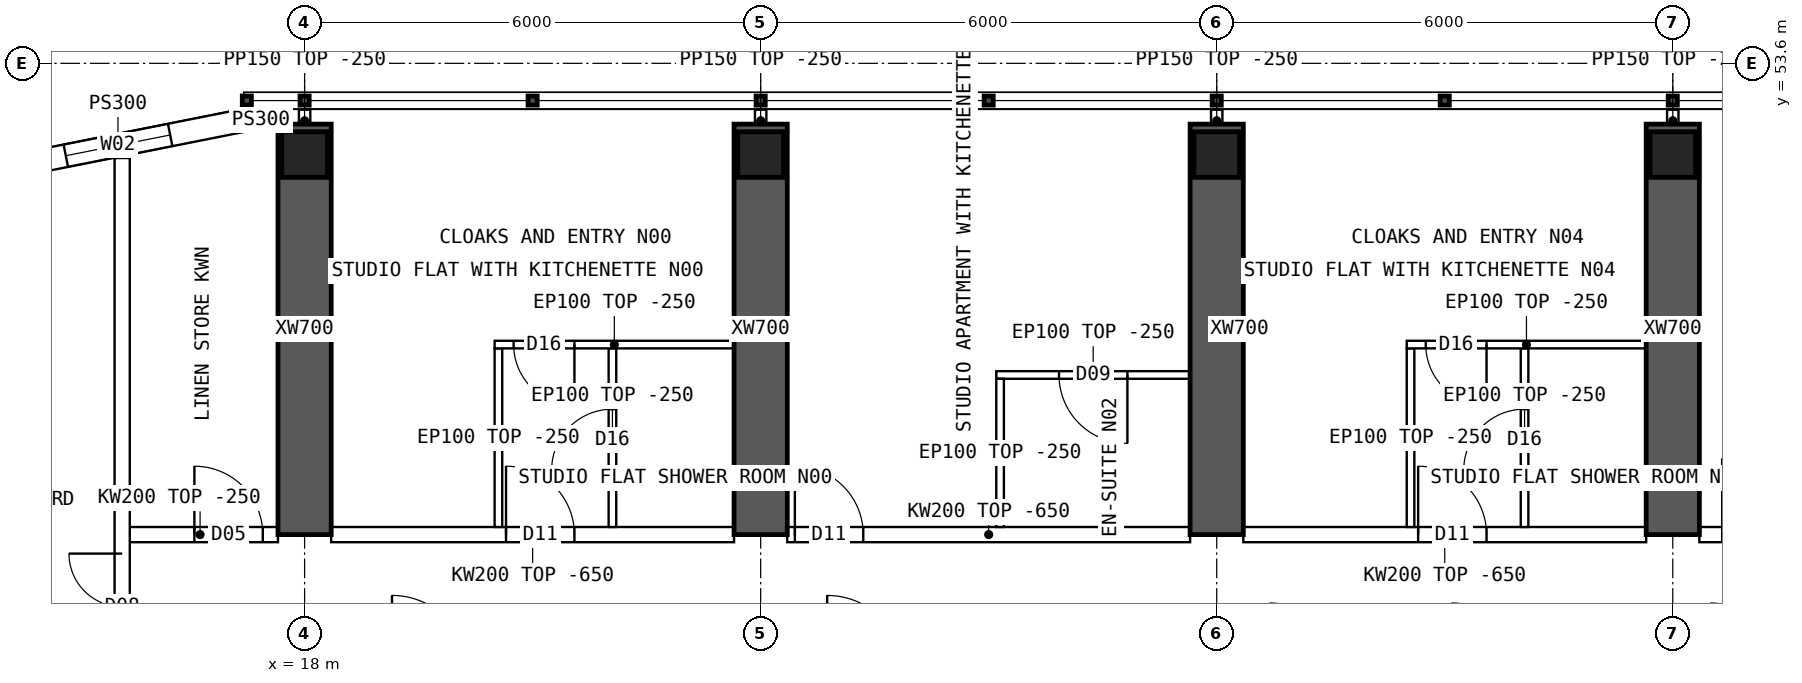
"""IFC4 building model, lengths in metres.
Left out: names, types, materials, properties, quantities, classifications, styles, units other than length and angle.
Written with IfcOpenShell. Run it as: python <this file> out.ifc"""

import sys

from ifc_helpers import new_model, si_unit, direction, frame, frame_2d, origin, origin_2d, place, context, subcontext, project, spatial, polyline, rectangle, hollow_rectangle, outline, extrude, element, fill, save


model = new_model("IFC4")
c1 = context("Model", 3, precision=1e-05, world=origin(), true_north=direction((0.0, 1.0)))
c2 = subcontext(c1, "Body", "Model", "MODEL_VIEW")
j1 = project(units=[si_unit("LENGTHUNIT", "METRE"), si_unit("PLANEANGLEUNIT", "RADIAN")], contexts=[c1])
p1 = place(None, origin())
s1 = spatial("IfcSite", under=j1, at=p1, CompositionType="ELEMENT")
p2 = place(p1, origin())
s2 = spatial("IfcBuilding", under=s1, at=p2, CompositionType="ELEMENT")
p3 = place(p2, frame((0.0, 0.0, 231.55)))
s3 = spatial("IfcBuildingStorey", under=s2, at=p3, CompositionType="ELEMENT", Elevation=231.55)
for number, where, z_axis, x_axis in (
    (1, (18.0, 52.4, 0.0), (0.0, 0.0, 1.0), (1.0, 0.0, 0.0)),
    (2, (24.0, 52.4, 0.0), (0.0, 0.0, 1.0), (1.0, 0.0, 0.0)),
    (3, (30.0, 52.4, 0.0), (0.0, 0.0, 1.0), (1.0, 0.0, 0.0)),
    (4, (36.0, 52.4, 0.0), (0.0, 0.0, 1.0), (1.0, 0.0, 0.0)),
):
    element("IfcColumn", number, at=place(p3, frame(where, z_axis=z_axis, x_axis=x_axis)), inside=s3, PredefinedType="COLUMN", context=c2, shape_type="SweptSolid", body=[
        extrude(hollow_rectangle(XDim=0.6, YDim=0.6, WallThickness=0.06, at=origin_2d()), origin(), (0.0, 0.0, 1.0), 3.75),
    ])
for number, where, z_axis, x_axis in (
    (5, (18.0, 47.4, 0.0), (0.0, 0.0, 1.0), (0.0, 1.0, 0.0)),
    (6, (24.0, 47.4, 0.0), (0.0, 0.0, 1.0), (0.0, 1.0, 0.0)),
    (7, (30.0, 47.4, 0.0), (0.0, 0.0, 1.0), (0.0, 1.0, 0.0)),
    (8, (36.0, 47.4, 0.0), (0.0, 0.0, 1.0), (0.0, 1.0, 0.0)),
):
    element("IfcWall", number, at=place(p3, frame(where, z_axis=z_axis, x_axis=x_axis)), inside=s3, PredefinedType="SHEAR", context=c2, shape_type="SweptSolid", body=[
        extrude(rectangle(XDim=5.4, YDim=0.7, at=frame_2d((2.7, 0.0))), origin(), (0.0, 0.0, 1.0), 3.75),
    ])
p4 = place(p3, frame((17.2, 52.85, 0.0), z_axis=(0.0, 0.0, 1.0), x_axis=(-0.98078325777, -0.195100490205, 0.0)))
e9 = element("IfcWall", 9, at=p4, inside=s3, PredefinedType="SOLIDWALL", context=c2, shape_type="SweptSolid", body=[
    extrude(outline(polyline([(-0.03, -0.15), (3.405, -0.15), (3.345, 0.15), (0.03, 0.15), (-0.03, -0.15)])), origin(), (0.0, 0.0, 1.0), 3.5),
])
p5 = place(p4, frame((0.988, 0.0, 0.9)))
e10 = element("IfcOpeningElement", 10, at=p5, cuts=e9, PredefinedType="OPENING", context=c2, shape_type="SweptSolid", body=[
    extrude(rectangle(XDim=1.4, YDim=1.8, at=frame_2d((0.7, 0.9))), frame((0.0, 0.16, 0.0), z_axis=(0.0, -1.0, 0.0), x_axis=(1.0, 0.0, 0.0)), (0.0, 0.0, 1.0), 0.32),
])
p6 = place(p3, frame((17.2, 52.85, 0.0), z_axis=(0.0, 0.0, 1.0), x_axis=(1.0, 0.0, 0.0)))
e11 = element("IfcWall", 11, at=p6, inside=s3, PredefinedType="SOLIDWALL", context=c2, shape_type="SweptSolid", body=[
    extrude(rectangle(XDim=0.45, YDim=0.3, at=frame_2d((0.225, 0.0))), origin(), (0.0, 0.0, 1.0), 3.5),
])
p7 = place(p3, frame((15.6, 47.4, 0.0), z_axis=(0.0, 0.0, 1.0), x_axis=(1.0, 0.0, 0.0)))
e12 = element("IfcWall", 12, at=p7, inside=s3, PredefinedType="SOLIDWALL", context=c2, shape_type="SweptSolid", body=[
    extrude(rectangle(XDim=2.05, YDim=0.2, at=frame_2d((1.025, 0.0))), origin(), (0.0, 0.0, 1.0), 3.5),
])
p8 = place(p7, frame((0.95, 0.0, 0.0)))
e13 = element("IfcOpeningElement", 13, at=p8, cuts=e12, PredefinedType="OPENING", context=c2, shape_type="SweptSolid", body=[
    extrude(rectangle(XDim=0.9, YDim=2.1, at=frame_2d((0.45, 1.05))), frame((0.0, 0.11, 0.0), z_axis=(0.0, -1.0, 0.0), x_axis=(1.0, 0.0, 0.0)), (0.0, 0.0, 1.0), 0.22),
])
p9 = place(p3, frame((18.35, 47.4, 0.0), z_axis=(0.0, 0.0, 1.0), x_axis=(1.0, 0.0, 0.0)))
e14 = element("IfcWall", 14, at=p9, inside=s3, PredefinedType="SOLIDWALL", context=c2, shape_type="SweptSolid", body=[
    extrude(outline(polyline([(0.0, 0.0), (5.3, 0.0), (5.3, 3.1), (0.0, 3.1), (0.0, 0.0)])), frame((0.0, 0.1, 0.0), z_axis=(0.0, -1.0, 0.0), x_axis=(1.0, 0.0, 0.0)), (0.0, 0.0, 1.0), 0.2),
])
p10 = place(p9, frame((2.3, 0.0, 0.0)))
e15 = element("IfcOpeningElement", 15, at=p10, cuts=e14, PredefinedType="OPENING", context=c2, shape_type="SweptSolid", body=[
    extrude(rectangle(XDim=0.9, YDim=2.1, at=frame_2d((0.45, 1.05))), frame((0.0, 0.11, 0.0), z_axis=(0.0, -1.0, 0.0), x_axis=(1.0, 0.0, 0.0)), (0.0, 0.0, 1.0), 0.22),
])
p11 = place(p3, frame((24.35, 47.4, 0.0), z_axis=(0.0, 0.0, 1.0), x_axis=(1.0, 0.0, 0.0)))
e16 = element("IfcWall", 16, at=p11, inside=s3, PredefinedType="SOLIDWALL", context=c2, shape_type="SweptSolid", body=[
    extrude(outline(polyline([(0.0, 0.0), (5.3, 0.0), (5.3, 3.1), (0.0, 3.1), (0.0, 0.0)])), frame((0.0, 0.1, 0.0), z_axis=(0.0, -1.0, 0.0), x_axis=(1.0, 0.0, 0.0)), (0.0, 0.0, 1.0), 0.2),
])
p12 = place(p11, frame((0.1, 0.0, 0.0)))
e17 = element("IfcOpeningElement", 17, at=p12, cuts=e16, PredefinedType="OPENING", context=c2, shape_type="SweptSolid", body=[
    extrude(rectangle(XDim=0.9, YDim=2.1, at=frame_2d((0.45, 1.05))), frame((0.0, 0.11, 0.0), z_axis=(0.0, -1.0, 0.0), x_axis=(1.0, 0.0, 0.0)), (0.0, 0.0, 1.0), 0.22),
])
p13 = place(p3, frame((30.35, 47.4, 0.0), z_axis=(0.0, 0.0, 1.0), x_axis=(1.0, 0.0, 0.0)))
e18 = element("IfcWall", 18, at=p13, inside=s3, PredefinedType="SOLIDWALL", context=c2, shape_type="SweptSolid", body=[
    extrude(outline(polyline([(0.0, 0.0), (5.3, 0.0), (5.3, 3.1), (0.0, 3.1), (0.0, 0.0)])), frame((0.0, 0.1, 0.0), z_axis=(0.0, -1.0, 0.0), x_axis=(1.0, 0.0, 0.0)), (0.0, 0.0, 1.0), 0.2),
])
p14 = place(p13, frame((2.3, 0.0, 0.0)))
e19 = element("IfcOpeningElement", 19, at=p14, cuts=e18, PredefinedType="OPENING", context=c2, shape_type="SweptSolid", body=[
    extrude(rectangle(XDim=0.9, YDim=2.1, at=frame_2d((0.45, 1.05))), frame((0.0, 0.11, 0.0), z_axis=(0.0, -1.0, 0.0), x_axis=(1.0, 0.0, 0.0)), (0.0, 0.0, 1.0), 0.22),
])
p15 = place(p3, frame((36.35, 47.4, 0.0), z_axis=(0.0, 0.0, 1.0), x_axis=(1.0, 0.0, 0.0)))
e20 = element("IfcWall", 20, at=p15, inside=s3, PredefinedType="SOLIDWALL", context=c2, shape_type="SweptSolid", body=[
    extrude(outline(polyline([(0.0, 0.0), (5.3, 0.0), (5.3, 3.1), (0.0, 3.1), (0.0, 0.0)])), frame((0.0, 0.1, 0.0), z_axis=(0.0, -1.0, 0.0), x_axis=(1.0, 0.0, 0.0)), (0.0, 0.0, 1.0), 0.2),
])
p16 = place(p15, frame((0.3, 0.0, 0.0)))
e21 = element("IfcOpeningElement", 21, at=p16, cuts=e20, PredefinedType="OPENING", context=c2, shape_type="SweptSolid", body=[
    extrude(rectangle(XDim=1.0, YDim=2.1, at=frame_2d((0.5, 1.05))), frame((0.0, 0.11, 0.0), z_axis=(0.0, -1.0, 0.0), x_axis=(1.0, 0.0, 0.0)), (0.0, 0.0, 1.0), 0.22),
])
p17 = place(p3, frame((20.5, 49.9, 0.0), z_axis=(0.0, 0.0, 1.0), x_axis=(1.0, 0.0, 0.0)))
e22 = element("IfcWall", 22, at=p17, inside=s3, PredefinedType="PARTITIONING", context=c2, shape_type="SweptSolid", body=[
    extrude(rectangle(XDim=3.15, YDim=0.1, at=frame_2d((1.575, 0.0))), origin(), (0.0, 0.0, 1.0), 3.5),
])
p18 = place(p17, frame((0.25, 0.0, 0.0)))
e23 = element("IfcOpeningElement", 23, at=p18, cuts=e22, PredefinedType="OPENING", context=c2, shape_type="SweptSolid", body=[
    extrude(rectangle(XDim=0.8, YDim=2.1, at=frame_2d((0.4, 1.05))), frame((0.0, 0.06, 0.0), z_axis=(0.0, -1.0, 0.0), x_axis=(1.0, 0.0, 0.0)), (0.0, 0.0, 1.0), 0.12),
])
p19 = place(p3, frame((20.55, 49.85, 0.0), z_axis=(0.0, 0.0, 1.0), x_axis=(0.0, -1.0, 0.0)))
e24 = element("IfcWall", 24, at=p19, inside=s3, PredefinedType="PARTITIONING", context=c2, shape_type="SweptSolid", body=[
    extrude(outline(polyline([(0.0, 0.0), (2.35, 0.0), (2.35, 3.1), (2.302, 3.1), (2.3, 3.5), (0.0, 3.5), (0.0, 0.0)])), frame((0.0, 0.05, 0.0), z_axis=(0.0, -1.0, 0.0), x_axis=(1.0, 0.0, 0.0)), (0.0, 0.0, 1.0), 0.1),
])
p20 = place(p3, frame((22.05, 49.85, 0.0), z_axis=(0.0, 0.0, 1.0), x_axis=(0.0, -1.0, 0.0)))
e25 = element("IfcWall", 25, at=p20, inside=s3, PredefinedType="PARTITIONING", context=c2, shape_type="SweptSolid", body=[
    extrude(outline(polyline([(0.0, 0.0), (2.35, 0.0), (2.35, 3.1), (2.302, 3.1), (2.3, 3.5), (0.0, 3.5), (0.0, 0.0)])), frame((0.0, 0.05, 0.0), z_axis=(0.0, -1.0, 0.0), x_axis=(1.0, 0.0, 0.0)), (0.0, 0.0, 1.0), 0.1),
])
p21 = place(p20, frame((0.8, 0.0, 0.0)))
e26 = element("IfcOpeningElement", 26, at=p21, cuts=e25, PredefinedType="OPENING", context=c2, shape_type="SweptSolid", body=[
    extrude(rectangle(XDim=0.8, YDim=2.1, at=frame_2d((0.4, 1.05))), frame((0.0, 0.06, 0.0), z_axis=(0.0, -1.0, 0.0), x_axis=(1.0, 0.0, 0.0)), (0.0, 0.0, 1.0), 0.12),
])
p22 = place(p3, frame((27.1, 49.5, 0.0), z_axis=(0.0, 0.0, 1.0), x_axis=(1.0, 0.0, 0.0)))
e27 = element("IfcWall", 27, at=p22, inside=s3, PredefinedType="PARTITIONING", context=c2, shape_type="SweptSolid", body=[
    extrude(rectangle(XDim=2.55, YDim=0.1, at=frame_2d((1.275, 0.0))), origin(), (0.0, 0.0, 1.0), 3.5),
])
p23 = place(p22, frame((0.825, 0.0, 0.0)))
e28 = element("IfcOpeningElement", 28, at=p23, cuts=e27, PredefinedType="OPENING", context=c2, shape_type="SweptSolid", body=[
    extrude(rectangle(XDim=0.9, YDim=2.1, at=frame_2d((0.45, 1.05))), frame((0.0, 0.06, 0.0), z_axis=(0.0, -1.0, 0.0), x_axis=(1.0, 0.0, 0.0)), (0.0, 0.0, 1.0), 0.12),
])
p24 = place(p3, frame((27.15, 49.45, 0.0), z_axis=(0.0, 0.0, 1.0), x_axis=(0.0, -1.0, 0.0)))
e29 = element("IfcWall", 29, at=p24, inside=s3, PredefinedType="PARTITIONING", context=c2, shape_type="SweptSolid", body=[
    extrude(outline(polyline([(0.0, 0.0), (1.95, 0.0), (1.95, 3.1), (1.902, 3.1), (1.9, 3.5), (0.0, 3.5), (0.0, 0.0)])), frame((0.0, 0.05, 0.0), z_axis=(0.0, -1.0, 0.0), x_axis=(1.0, 0.0, 0.0)), (0.0, 0.0, 1.0), 0.1),
])
p25 = place(p3, frame((32.5, 49.9, 0.0), z_axis=(0.0, 0.0, 1.0), x_axis=(1.0, 0.0, 0.0)))
e30 = element("IfcWall", 30, at=p25, inside=s3, PredefinedType="PARTITIONING", context=c2, shape_type="SweptSolid", body=[
    extrude(rectangle(XDim=3.15, YDim=0.1, at=frame_2d((1.575, 0.0))), origin(), (0.0, 0.0, 1.0), 3.5),
])
p26 = place(p25, frame((0.25, 0.0, 0.0)))
e31 = element("IfcOpeningElement", 31, at=p26, cuts=e30, PredefinedType="OPENING", context=c2, shape_type="SweptSolid", body=[
    extrude(rectangle(XDim=0.8, YDim=2.1, at=frame_2d((0.4, 1.05))), frame((0.0, 0.06, 0.0), z_axis=(0.0, -1.0, 0.0), x_axis=(1.0, 0.0, 0.0)), (0.0, 0.0, 1.0), 0.12),
])
p27 = place(p3, frame((32.55, 49.85, 0.0), z_axis=(0.0, 0.0, 1.0), x_axis=(0.0, -1.0, 0.0)))
e32 = element("IfcWall", 32, at=p27, inside=s3, PredefinedType="PARTITIONING", context=c2, shape_type="SweptSolid", body=[
    extrude(outline(polyline([(0.0, 0.0), (2.35, 0.0), (2.35, 3.1), (2.302, 3.1), (2.3, 3.5), (0.0, 3.5), (0.0, 0.0)])), frame((0.0, 0.05, 0.0), z_axis=(0.0, -1.0, 0.0), x_axis=(1.0, 0.0, 0.0)), (0.0, 0.0, 1.0), 0.1),
])
p28 = place(p3, frame((34.05, 49.85, 0.0), z_axis=(0.0, 0.0, 1.0), x_axis=(0.0, -1.0, 0.0)))
e33 = element("IfcWall", 33, at=p28, inside=s3, PredefinedType="PARTITIONING", context=c2, shape_type="SweptSolid", body=[
    extrude(outline(polyline([(0.0, 0.0), (2.35, 0.0), (2.35, 3.1), (2.302, 3.1), (2.3, 3.5), (0.0, 3.5), (0.0, 0.0)])), frame((0.0, 0.05, 0.0), z_axis=(0.0, -1.0, 0.0), x_axis=(1.0, 0.0, 0.0)), (0.0, 0.0, 1.0), 0.1),
])
p29 = place(p28, frame((0.8, 0.0, 0.0)))
e34 = element("IfcOpeningElement", 34, at=p29, cuts=e33, PredefinedType="OPENING", context=c2, shape_type="SweptSolid", body=[
    extrude(rectangle(XDim=0.8, YDim=2.1, at=frame_2d((0.4, 1.05))), frame((0.0, 0.06, 0.0), z_axis=(0.0, -1.0, 0.0), x_axis=(1.0, 0.0, 0.0)), (0.0, 0.0, 1.0), 0.12),
])
p30 = place(p3, frame((15.6, 11.646, 0.0), z_axis=(0.0, 0.0, 1.0), x_axis=(0.0, 1.0, 0.0)))
e35 = element("IfcWall", 35, at=p30, inside=s3, PredefinedType="SOLIDWALL", context=c2, shape_type="SweptSolid", body=[
    extrude(rectangle(XDim=40.708, YDim=0.2, at=frame_2d((20.354, 0.0))), origin(), (0.0, 0.0, 1.0), 3.5),
])
p31 = place(p30, frame((13.434, 0.0, 0.0)))
e36 = element("IfcOpeningElement", 36, at=p31, cuts=e35, PredefinedType="OPENING", context=c2, shape_type="SweptSolid", body=[
    extrude(rectangle(XDim=1.2, YDim=2.1, at=frame_2d((0.6, 1.05))), frame((0.0, 0.11, 0.0), z_axis=(0.0, -1.0, 0.0), x_axis=(1.0, 0.0, 0.0)), (0.0, 0.0, 1.0), 0.22),
])
p32 = place(p30, frame((5.104, 0.0, 0.0)))
e37 = element("IfcOpeningElement", 37, at=p32, cuts=e35, PredefinedType="OPENING", context=c2, shape_type="SweptSolid", body=[
    extrude(rectangle(XDim=1.4, YDim=2.1, at=frame_2d((0.7, 1.05))), frame((0.0, 0.11, 0.0), z_axis=(0.0, -1.0, 0.0), x_axis=(1.0, 0.0, 0.0)), (0.0, 0.0, 1.0), 0.22),
])
p33 = place(p30, frame((34.104, 0.0, 0.0)))
e38 = element("IfcOpeningElement", 38, at=p33, cuts=e35, PredefinedType="OPENING", context=c2, shape_type="SweptSolid", body=[
    extrude(rectangle(XDim=1.4, YDim=2.1, at=frame_2d((0.7, 1.05))), frame((0.0, 0.11, 0.0), z_axis=(0.0, -1.0, 0.0), x_axis=(1.0, 0.0, 0.0)), (0.0, 0.0, 1.0), 0.22),
])
for number, where, z_axis, x_axis in (
    (39, (18.0, 52.7, 0.0), (0.0, 0.0, 1.0), (0.0, 1.0, 0.0)),
    (40, (24.0, 52.7, 0.0), (0.0, 0.0, 1.0), (0.0, 1.0, 0.0)),
    (41, (30.0, 52.7, 0.0), (0.0, 0.0, 1.0), (0.0, 1.0, 0.0)),
    (42, (36.0, 52.7, 0.0), (0.0, 0.0, 1.0), (0.0, 1.0, 0.0)),
):
    element("IfcWall", number, at=place(p3, frame(where, z_axis=z_axis, x_axis=x_axis)), inside=s3, PredefinedType="PARTITIONING", context=c2, shape_type="SweptSolid", body=[
        extrude(rectangle(XDim=0.29, YDim=0.15, at=frame_2d((0.145, 0.0))), origin(), (0.0, 0.0, 1.0), 3.5),
    ])
p34 = place(p5, origin())
e43 = element("IfcWindow", 43, at=p34, inside=s3, PartitioningType="SINGLE_PANEL", PredefinedType="WINDOW", context=c2, shape_type="SweptSolid", body=[
    extrude(rectangle(XDim=1.4, YDim=1.8, at=frame_2d((0.7, 0.9))), frame((0.0, 0.03, 0.0), z_axis=(0.0, -1.0, 0.0), x_axis=(1.0, 0.0, 0.0)), (0.0, 0.0, 1.0), 0.06),
])
fill(e10, e43)
p35 = place(p18, origin())
e44 = element("IfcDoor", 44, at=p35, inside=s3, OperationType="SINGLE_SWING_RIGHT", PredefinedType="DOOR", context=c2, shape_type="SweptSolid", body=[
    extrude(rectangle(XDim=0.8, YDim=2.1, at=frame_2d((0.4, 1.05))), frame((0.0, 0.025, 0.0), z_axis=(0.0, -1.0, 0.0), x_axis=(1.0, 0.0, 0.0)), (0.0, 0.0, 1.0), 0.05),
])
fill(e23, e44)
p36 = place(p21, origin())
e45 = element("IfcDoor", 45, at=p36, inside=s3, OperationType="SINGLE_SWING_RIGHT", PredefinedType="DOOR", context=c2, shape_type="SweptSolid", body=[
    extrude(rectangle(XDim=0.8, YDim=2.1, at=frame_2d((0.4, 1.05))), frame((0.0, 0.025, 0.0), z_axis=(0.0, -1.0, 0.0), x_axis=(1.0, 0.0, 0.0)), (0.0, 0.0, 1.0), 0.05),
])
fill(e26, e45)
p37 = place(p10, origin())
e46 = element("IfcDoor", 46, at=p37, inside=s3, OperationType="SINGLE_SWING_LEFT", PredefinedType="DOOR", context=c2, shape_type="SweptSolid", body=[
    extrude(rectangle(XDim=0.9, YDim=2.1, at=frame_2d((0.45, 1.05))), frame((0.0, 0.025, 0.0), z_axis=(0.0, -1.0, 0.0), x_axis=(1.0, 0.0, 0.0)), (0.0, 0.0, 1.0), 0.05),
])
fill(e15, e46)
p38 = place(p23, origin())
e47 = element("IfcDoor", 47, at=p38, inside=s3, OperationType="SINGLE_SWING_RIGHT", PredefinedType="DOOR", context=c2, shape_type="SweptSolid", body=[
    extrude(rectangle(XDim=0.9, YDim=2.1, at=frame_2d((0.45, 1.05))), frame((0.0, 0.025, 0.0), z_axis=(0.0, -1.0, 0.0), x_axis=(1.0, 0.0, 0.0)), (0.0, 0.0, 1.0), 0.05),
])
fill(e28, e47)
p39 = place(p12, origin())
e48 = element("IfcDoor", 48, at=p39, inside=s3, OperationType="SINGLE_SWING_LEFT", PredefinedType="DOOR", context=c2, shape_type="SweptSolid", body=[
    extrude(rectangle(XDim=0.9, YDim=2.1, at=frame_2d((0.45, 1.05))), frame((0.0, 0.025, 0.0), z_axis=(0.0, -1.0, 0.0), x_axis=(1.0, 0.0, 0.0)), (0.0, 0.0, 1.0), 0.05),
])
fill(e17, e48)
p40 = place(p26, origin())
e49 = element("IfcDoor", 49, at=p40, inside=s3, OperationType="SINGLE_SWING_RIGHT", PredefinedType="DOOR", context=c2, shape_type="SweptSolid", body=[
    extrude(rectangle(XDim=0.8, YDim=2.1, at=frame_2d((0.4, 1.05))), frame((0.0, 0.025, 0.0), z_axis=(0.0, -1.0, 0.0), x_axis=(1.0, 0.0, 0.0)), (0.0, 0.0, 1.0), 0.05),
])
fill(e31, e49)
p41 = place(p29, origin())
e50 = element("IfcDoor", 50, at=p41, inside=s3, OperationType="SINGLE_SWING_RIGHT", PredefinedType="DOOR", context=c2, shape_type="SweptSolid", body=[
    extrude(rectangle(XDim=0.8, YDim=2.1, at=frame_2d((0.4, 1.05))), frame((0.0, 0.025, 0.0), z_axis=(0.0, -1.0, 0.0), x_axis=(1.0, 0.0, 0.0)), (0.0, 0.0, 1.0), 0.05),
])
fill(e34, e50)
p42 = place(p14, origin())
e51 = element("IfcDoor", 51, at=p42, inside=s3, OperationType="SINGLE_SWING_LEFT", PredefinedType="DOOR", context=c2, shape_type="SweptSolid", body=[
    extrude(rectangle(XDim=0.9, YDim=2.1, at=frame_2d((0.45, 1.05))), frame((0.0, 0.025, 0.0), z_axis=(0.0, -1.0, 0.0), x_axis=(1.0, 0.0, 0.0)), (0.0, 0.0, 1.0), 0.05),
])
fill(e19, e51)
p43 = place(p33, origin())
e52 = element("IfcDoor", 52, at=p43, inside=s3, OperationType="DOUBLE_DOOR_SINGLE_SWING", PredefinedType="DOOR", context=c2, shape_type="SweptSolid", body=[
    extrude(rectangle(XDim=1.4, YDim=2.1, at=frame_2d((0.7, 1.05))), frame((0.0, 0.025, 0.0), z_axis=(0.0, -1.0, 0.0), x_axis=(1.0, 0.0, 0.0)), (0.0, 0.0, 1.0), 0.05),
])
fill(e38, e52)
p44 = place(p8, origin())
e53 = element("IfcDoor", 53, at=p44, inside=s3, OperationType="SINGLE_SWING_LEFT", PredefinedType="DOOR", context=c2, shape_type="SweptSolid", body=[
    extrude(rectangle(XDim=0.9, YDim=2.1, at=frame_2d((0.45, 1.05))), frame((0.0, 0.025, 0.0), z_axis=(0.0, -1.0, 0.0), x_axis=(1.0, 0.0, 0.0)), (0.0, 0.0, 1.0), 0.05),
])
fill(e13, e53)
save(model, sys.argv[1])
